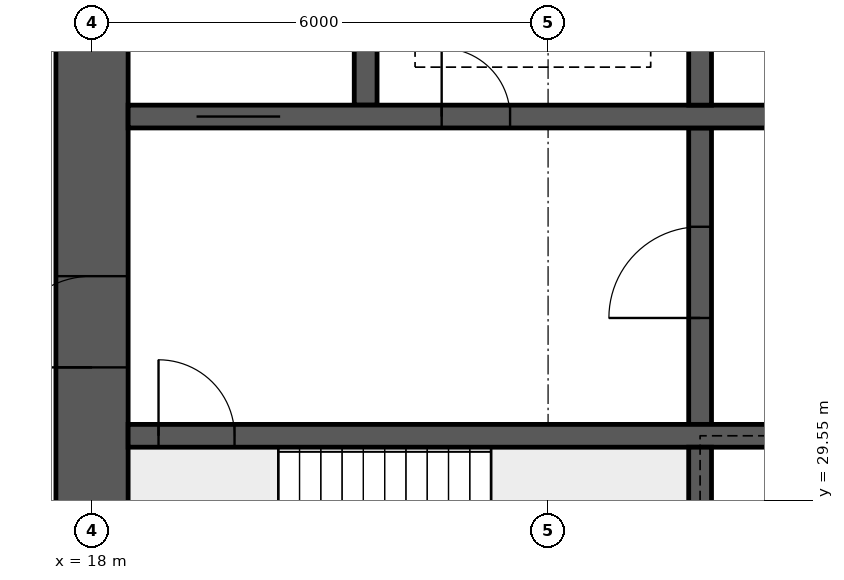
"""IFC4 building model, lengths in metres.
Left out: names, types, materials, properties, quantities, classifications, styles, units other than length and angle.
Written with IfcOpenShell. Run it as: python <this file> out.ifc"""

import sys

from ifc_helpers import new_model, si_unit, direction, frame, frame_2d, origin, place, context, subcontext, project, spatial, rectangle, extrude, element, fill, save


model = new_model("IFC4")
c1 = context("Model", 3, precision=1e-05, world=origin(), true_north=direction((0.0, 1.0)))
c2 = subcontext(c1, "Body", "Model", "MODEL_VIEW")
j1 = project(units=[si_unit("LENGTHUNIT", "METRE"), si_unit("PLANEANGLEUNIT", "RADIAN")], contexts=[c1])
p1 = place(None, origin())
s1 = spatial("IfcSite", under=j1, at=p1, CompositionType="ELEMENT")
p2 = place(p1, origin())
s2 = spatial("IfcBuilding", under=s1, at=p2, CompositionType="ELEMENT")
p3 = place(p2, frame((0.0, 0.0, 133.15)))
s3 = spatial("IfcBuildingStorey", under=s2, at=p3, CompositionType="ELEMENT", Elevation=133.15)
p4 = place(p3, frame((18.0, 26.275, 0.0), z_axis=(0.0, 0.0, 1.0), x_axis=(0.0, 1.0, 0.0)))
e1 = element("IfcWall", 1, at=p4, inside=s3, PredefinedType="SHEAR", context=c2, shape_type="SweptSolid", body=[
    extrude(rectangle(XDim=11.45, YDim=0.95, at=frame_2d((5.725, 0.0))), origin(), (0.0, 0.0, 1.0), 7.2),
])
p5 = place(p4, frame((5.025, 0.0, 0.0)))
e2 = element("IfcOpeningElement", 2, at=p5, cuts=e1, PredefinedType="OPENING", context=c2, shape_type="SweptSolid", body=[
    extrude(rectangle(XDim=1.2, YDim=2.1, at=frame_2d((0.6, 1.05))), frame((0.0, 0.485, 0.0), z_axis=(0.0, -1.0, 0.0), x_axis=(1.0, 0.0, 0.0)), (0.0, 0.0, 1.0), 0.97),
])
p6 = place(p3, frame((18.475, 30.4, 0.0), z_axis=(0.0, 0.0, 1.0), x_axis=(1.0, 0.0, 0.0)))
e3 = element("IfcWall", 3, at=p6, inside=s3, PredefinedType="SHEAR", context=c2, shape_type="SweptSolid", body=[
    extrude(rectangle(XDim=47.05, YDim=0.3, at=frame_2d((23.525, 0.0))), origin(), (0.0, 0.0, 1.0), 7.2),
])
p7 = place(p6, frame((0.4, 0.0, 0.0)))
e4 = element("IfcOpeningElement", 4, at=p7, cuts=e3, PredefinedType="OPENING", context=c2, shape_type="SweptSolid", body=[
    extrude(rectangle(XDim=1.0, YDim=2.1, at=frame_2d((0.5, 1.05))), frame((0.0, 0.16, 0.0), z_axis=(0.0, -1.0, 0.0), x_axis=(1.0, 0.0, 0.0)), (0.0, 0.0, 1.0), 0.32),
])
p8 = place(p6, frame((45.65, 0.0, 0.0)))
e5 = element("IfcOpeningElement", 5, at=p8, cuts=e3, PredefinedType="OPENING", context=c2, shape_type="SweptSolid", body=[
    extrude(rectangle(XDim=1.0, YDim=2.1, at=frame_2d((0.5, 1.05))), frame((0.0, 0.16, 0.0), z_axis=(0.0, -1.0, 0.0), x_axis=(1.0, 0.0, 0.0)), (0.0, 0.0, 1.0), 0.32),
])
p9 = place(p6, frame((18.85, 0.0, 0.0)))
e6 = element("IfcOpeningElement", 6, at=p9, cuts=e3, PredefinedType="OPENING", context=c2, shape_type="SweptSolid", body=[
    extrude(rectangle(XDim=0.9, YDim=2.1, at=frame_2d((0.45, 1.05))), frame((0.0, 0.16, 0.0), z_axis=(0.0, -1.0, 0.0), x_axis=(1.0, 0.0, 0.0)), (0.0, 0.0, 1.0), 0.32),
])
p10 = place(p6, frame((30.142, 0.0, 0.0)))
e7 = element("IfcOpeningElement", 7, at=p10, cuts=e3, PredefinedType="OPENING", context=c2, shape_type="SweptSolid", body=[
    extrude(rectangle(XDim=1.1, YDim=2.1, at=frame_2d((0.55, 1.05))), frame((0.0, 0.16, 0.0), z_axis=(0.0, -1.0, 0.0), x_axis=(1.0, 0.0, 0.0)), (0.0, 0.0, 1.0), 0.32),
])
p11 = place(p6, frame((33.675, 0.0, 0.0)))
e8 = element("IfcOpeningElement", 8, at=p11, cuts=e3, PredefinedType="OPENING", context=c2, shape_type="SweptSolid", body=[
    extrude(rectangle(XDim=1.1, YDim=2.1, at=frame_2d((0.55, 1.05))), frame((0.0, 0.16, 0.0), z_axis=(0.0, -1.0, 0.0), x_axis=(1.0, 0.0, 0.0)), (0.0, 0.0, 1.0), 0.32),
])
p12 = place(p6, frame((37.208, 0.0, 0.0)))
e9 = element("IfcOpeningElement", 9, at=p12, cuts=e3, PredefinedType="OPENING", context=c2, shape_type="SweptSolid", body=[
    extrude(rectangle(XDim=1.1, YDim=2.1, at=frame_2d((0.55, 1.05))), frame((0.0, 0.16, 0.0), z_axis=(0.0, -1.0, 0.0), x_axis=(1.0, 0.0, 0.0)), (0.0, 0.0, 1.0), 0.32),
])
p13 = place(p3, frame((18.475, 34.6, 0.0), z_axis=(0.0, 0.0, 1.0), x_axis=(1.0, 0.0, 0.0)))
e10 = element("IfcWall", 10, at=p13, inside=s3, PredefinedType="SHEAR", context=c2, shape_type="SweptSolid", body=[
    extrude(rectangle(XDim=47.05, YDim=0.3, at=frame_2d((23.525, 0.0))), origin(), (0.0, 0.0, 1.0), 7.2),
])
p14 = place(p13, frame((0.9, 0.0, 0.0)))
e11 = element("IfcOpeningElement", 11, at=p14, cuts=e10, PredefinedType="OPENING", context=c2, shape_type="SweptSolid", body=[
    extrude(rectangle(XDim=1.1, YDim=2.1, at=frame_2d((0.55, 1.05))), frame((0.0, 0.16, 0.0), z_axis=(0.0, -1.0, 0.0), x_axis=(1.0, 0.0, 0.0)), (0.0, 0.0, 1.0), 0.32),
])
p15 = place(p13, frame((45.05, 0.0, 0.0)))
e12 = element("IfcOpeningElement", 12, at=p15, cuts=e10, PredefinedType="OPENING", context=c2, shape_type="SweptSolid", body=[
    extrude(rectangle(XDim=1.1, YDim=2.1, at=frame_2d((0.55, 1.05))), frame((0.0, 0.16, 0.0), z_axis=(0.0, -1.0, 0.0), x_axis=(1.0, 0.0, 0.0)), (0.0, 0.0, 1.0), 0.32),
])
p16 = place(p13, frame((4.125, 0.0, 0.0)))
e13 = element("IfcOpeningElement", 13, at=p16, cuts=e10, PredefinedType="OPENING", context=c2, shape_type="SweptSolid", body=[
    extrude(rectangle(XDim=0.9, YDim=2.1, at=frame_2d((0.45, 1.05))), frame((0.0, 0.16, 0.0), z_axis=(0.0, -1.0, 0.0), x_axis=(1.0, 0.0, 0.0)), (0.0, 0.0, 1.0), 0.32),
])
p17 = place(p13, frame((42.025, 0.0, 0.0)))
e14 = element("IfcOpeningElement", 14, at=p17, cuts=e10, PredefinedType="OPENING", context=c2, shape_type="SweptSolid", body=[
    extrude(rectangle(XDim=0.9, YDim=2.1, at=frame_2d((0.45, 1.05))), frame((0.0, 0.16, 0.0), z_axis=(0.0, -1.0, 0.0), x_axis=(1.0, 0.0, 0.0)), (0.0, 0.0, 1.0), 0.32),
])
p18 = place(p13, frame((8.9, 0.0, 0.0)))
e15 = element("IfcOpeningElement", 15, at=p18, cuts=e10, PredefinedType="OPENING", context=c2, shape_type="SweptSolid", body=[
    extrude(rectangle(XDim=0.9, YDim=2.1, at=frame_2d((0.45, 1.05))), frame((0.0, 0.16, 0.0), z_axis=(0.0, -1.0, 0.0), x_axis=(1.0, 0.0, 0.0)), (0.0, 0.0, 1.0), 0.32),
])
p19 = place(p13, frame((12.874, 0.0, 0.0)))
e16 = element("IfcOpeningElement", 16, at=p19, cuts=e10, PredefinedType="OPENING", context=c2, shape_type="SweptSolid", body=[
    extrude(rectangle(XDim=0.9, YDim=2.1, at=frame_2d((0.45, 1.05))), frame((0.0, 0.16, 0.0), z_axis=(0.0, -1.0, 0.0), x_axis=(1.0, 0.0, 0.0)), (0.0, 0.0, 1.0), 0.32),
])
p20 = place(p13, frame((16.521, 0.0, 0.0)))
e17 = element("IfcOpeningElement", 17, at=p20, cuts=e10, PredefinedType="OPENING", context=c2, shape_type="SweptSolid", body=[
    extrude(rectangle(XDim=0.9, YDim=2.1, at=frame_2d((0.45, 1.05))), frame((0.0, 0.16, 0.0), z_axis=(0.0, -1.0, 0.0), x_axis=(1.0, 0.0, 0.0)), (0.0, 0.0, 1.0), 0.32),
])
p21 = place(p13, frame((20.28, 0.0, 0.0)))
e18 = element("IfcOpeningElement", 18, at=p21, cuts=e10, PredefinedType="OPENING", context=c2, shape_type="SweptSolid", body=[
    extrude(rectangle(XDim=0.9, YDim=2.1, at=frame_2d((0.45, 1.05))), frame((0.0, 0.16, 0.0), z_axis=(0.0, -1.0, 0.0), x_axis=(1.0, 0.0, 0.0)), (0.0, 0.0, 1.0), 0.32),
])
p22 = place(p13, frame((24.686, 0.0, 0.0)))
e19 = element("IfcOpeningElement", 19, at=p22, cuts=e10, PredefinedType="OPENING", context=c2, shape_type="SweptSolid", body=[
    extrude(rectangle(XDim=0.9, YDim=2.1, at=frame_2d((0.45, 1.05))), frame((0.0, 0.16, 0.0), z_axis=(0.0, -1.0, 0.0), x_axis=(1.0, 0.0, 0.0)), (0.0, 0.0, 1.0), 0.32),
])
p23 = place(p13, frame((27.483, 0.0, 0.0)))
e20 = element("IfcOpeningElement", 20, at=p23, cuts=e10, PredefinedType="OPENING", context=c2, shape_type="SweptSolid", body=[
    extrude(rectangle(XDim=0.9, YDim=2.1, at=frame_2d((0.45, 1.05))), frame((0.0, 0.16, 0.0), z_axis=(0.0, -1.0, 0.0), x_axis=(1.0, 0.0, 0.0)), (0.0, 0.0, 1.0), 0.32),
])
p24 = place(p13, frame((33.604, 0.0, 0.0)))
e21 = element("IfcOpeningElement", 21, at=p24, cuts=e10, PredefinedType="OPENING", context=c2, shape_type="SweptSolid", body=[
    extrude(rectangle(XDim=0.9, YDim=2.1, at=frame_2d((0.45, 1.05))), frame((0.0, 0.16, 0.0), z_axis=(0.0, -1.0, 0.0), x_axis=(1.0, 0.0, 0.0)), (0.0, 0.0, 1.0), 0.32),
])
p25 = place(p3, frame((26.0, 26.275, 0.0), z_axis=(0.0, 0.0, 1.0), x_axis=(0.0, 1.0, 0.0)))
e22 = element("IfcWall", 22, at=p25, inside=s3, PredefinedType="SHEAR", context=c2, shape_type="SweptSolid", body=[
    extrude(rectangle(XDim=3.975, YDim=0.3, at=frame_2d((1.988, 0.0))), origin(), (0.0, 0.0, 1.0), 7.2),
])
p26 = place(p3, frame((26.0, 30.55, 0.0), z_axis=(0.0, 0.0, 1.0), x_axis=(0.0, 1.0, 0.0)))
e23 = element("IfcWall", 23, at=p26, inside=s3, PredefinedType="SHEAR", context=c2, shape_type="SweptSolid", body=[
    extrude(rectangle(XDim=3.9, YDim=0.3, at=frame_2d((1.95, 0.0))), origin(), (0.0, 0.0, 1.0), 7.2),
])
p27 = place(p26, frame((1.4, 0.0, 0.0)))
e24 = element("IfcOpeningElement", 24, at=p27, cuts=e23, PredefinedType="OPENING", context=c2, shape_type="SweptSolid", body=[
    extrude(rectangle(XDim=1.2, YDim=2.1, at=frame_2d((0.6, 1.05))), frame((0.0, 0.16, 0.0), z_axis=(0.0, -1.0, 0.0), x_axis=(1.0, 0.0, 0.0)), (0.0, 0.0, 1.0), 0.32),
])
for number, where, z_axis, x_axis in (
    (25, (21.6, 34.75, 0.0), (0.0, 0.0, 1.0), (0.0, 1.0, 0.0)),
    (26, (26.0, 34.75, 0.0), (0.0, 0.0, 1.0), (0.0, 1.0, 0.0)),
):
    element("IfcWall", number, at=place(p3, frame(where, z_axis=z_axis, x_axis=x_axis)), inside=s3, PredefinedType="SHEAR", context=c2, shape_type="SweptSolid", body=[
        extrude(rectangle(XDim=2.975, YDim=0.3, at=frame_2d((1.488, 0.0))), origin(), (0.0, 0.0, 1.0), 7.2),
    ])
p28 = place(p5, origin())
e27 = element("IfcDoor", 27, at=p28, inside=s3, OperationType="SINGLE_SWING_LEFT", PredefinedType="DOOR", context=c2, shape_type="SweptSolid", body=[
    extrude(rectangle(XDim=1.2, YDim=2.1, at=frame_2d((0.6, 1.05))), frame((0.0, 0.025, 0.0), z_axis=(0.0, -1.0, 0.0), x_axis=(1.0, 0.0, 0.0)), (0.0, 0.0, 1.0), 0.05),
])
fill(e2, e27)
p29 = place(p7, origin())
e28 = element("IfcDoor", 28, at=p29, inside=s3, OperationType="SINGLE_SWING_LEFT", PredefinedType="DOOR", context=c2, shape_type="SweptSolid", body=[
    extrude(rectangle(XDim=1.0, YDim=2.1, at=frame_2d((0.5, 1.05))), frame((0.0, 0.025, 0.0), z_axis=(0.0, -1.0, 0.0), x_axis=(1.0, 0.0, 0.0)), (0.0, 0.0, 1.0), 0.05),
])
fill(e4, e28)
p30 = place(p14, origin())
e29 = element("IfcDoor", 29, at=p30, inside=s3, OperationType="DOUBLE_DOOR_SLIDING", PredefinedType="DOOR", context=c2, shape_type="SweptSolid", body=[
    extrude(rectangle(XDim=1.1, YDim=2.1, at=frame_2d((0.55, 1.05))), frame((0.0, 0.025, 0.0), z_axis=(0.0, -1.0, 0.0), x_axis=(1.0, 0.0, 0.0)), (0.0, 0.0, 1.0), 0.05),
])
fill(e11, e29)
p31 = place(p16, origin())
e30 = element("IfcDoor", 30, at=p31, inside=s3, OperationType="SINGLE_SWING_LEFT", PredefinedType="DOOR", context=c2, shape_type="SweptSolid", body=[
    extrude(rectangle(XDim=0.9, YDim=2.1, at=frame_2d((0.45, 1.05))), frame((0.0, 0.025, 0.0), z_axis=(0.0, -1.0, 0.0), x_axis=(1.0, 0.0, 0.0)), (0.0, 0.0, 1.0), 0.05),
])
fill(e13, e30)
p32 = place(p27, origin())
e31 = element("IfcDoor", 31, at=p32, inside=s3, OperationType="SINGLE_SWING_LEFT", PredefinedType="DOOR", context=c2, shape_type="SweptSolid", body=[
    extrude(rectangle(XDim=1.2, YDim=2.1, at=frame_2d((0.6, 1.05))), frame((0.0, 0.025, 0.0), z_axis=(0.0, -1.0, 0.0), x_axis=(1.0, 0.0, 0.0)), (0.0, 0.0, 1.0), 0.05),
])
fill(e24, e31)
save(model, sys.argv[1])
